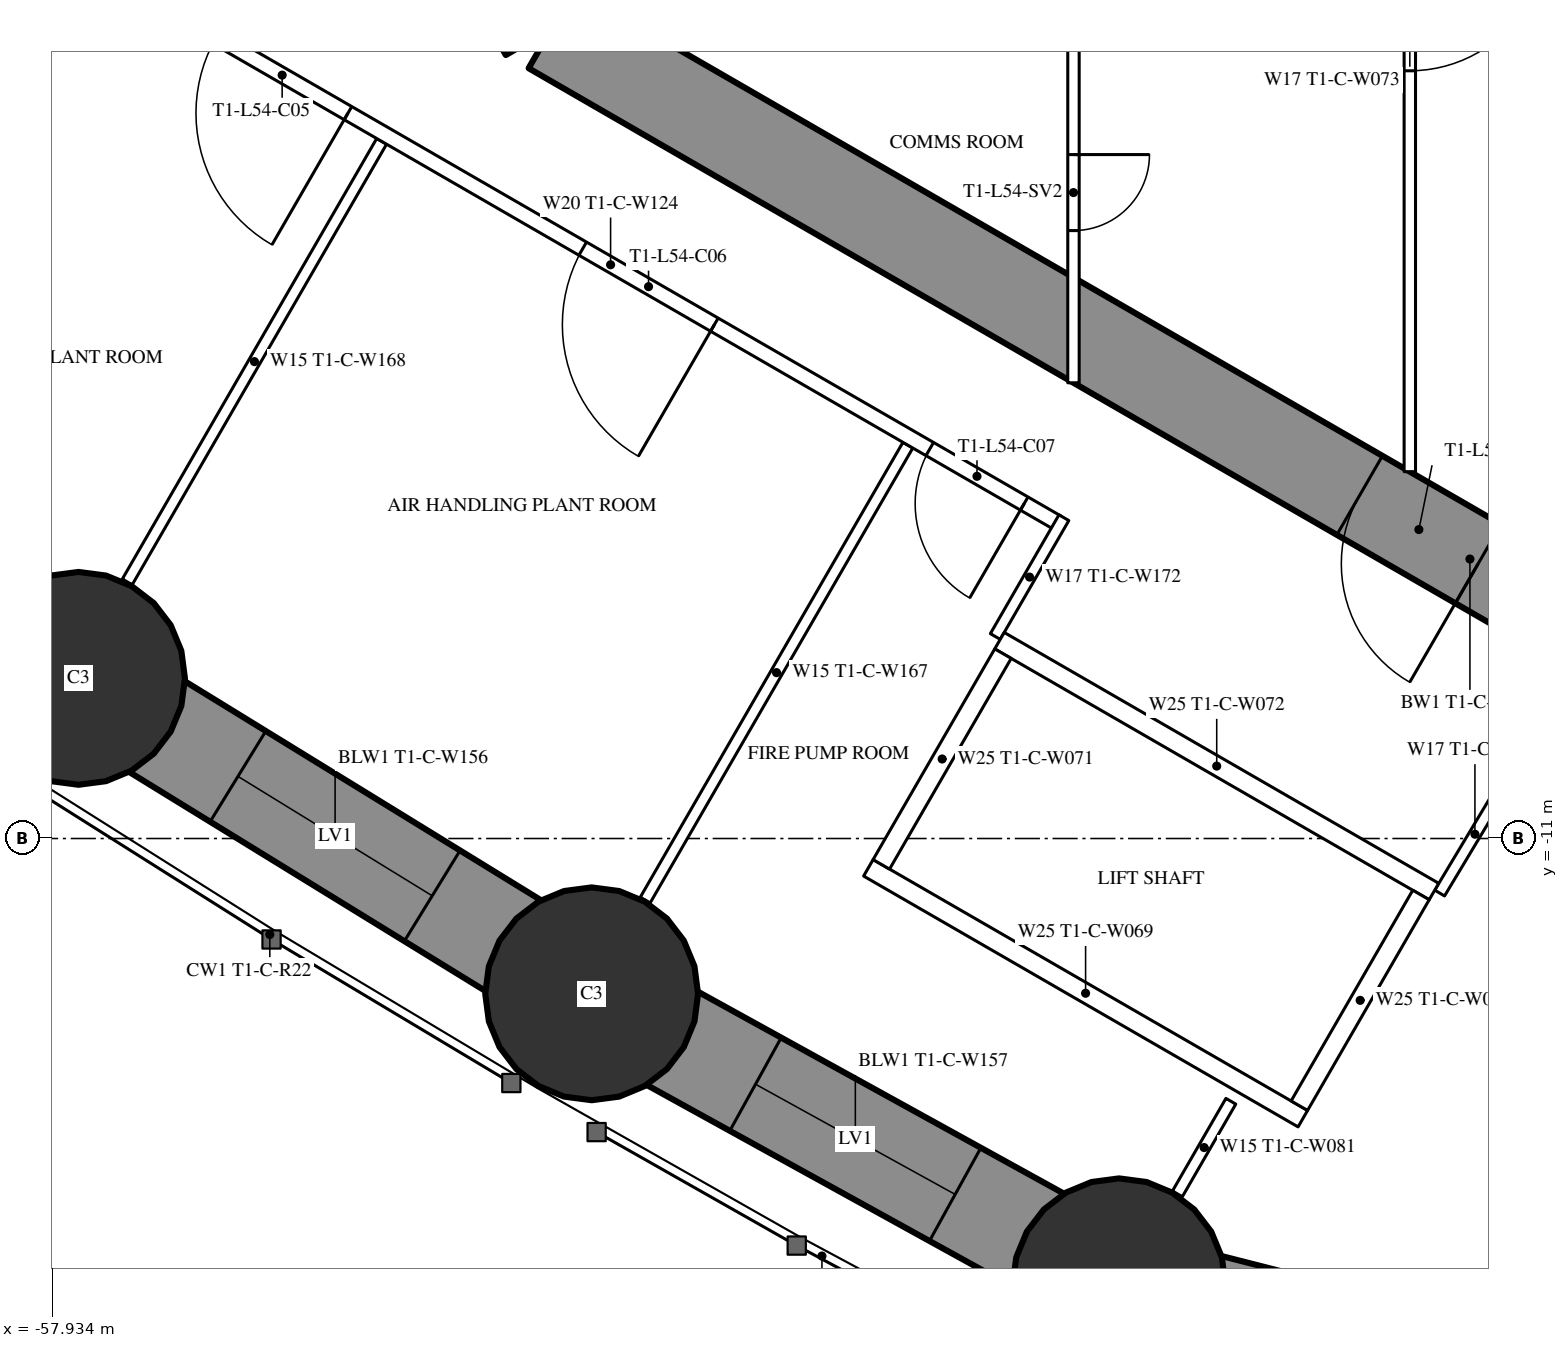
"""IFC4 building model, lengths in metres.
Left out: names, types, materials, properties, quantities, classifications, styles, units other than length and angle.
Written with IfcOpenShell. Run it as: python <this file> out.ifc"""

import sys

from ifc_helpers import new_model, si_unit, direction, frame, frame_2d, origin, origin_2d, place, context, subcontext, project, spatial, rectangle, circle, extrude, element, fill, save


model = new_model("IFC4")
c1 = context("Model", 3, precision=1e-05, world=origin(), true_north=direction((0.0, 1.0)))
c2 = subcontext(c1, "Body", "Model", "MODEL_VIEW")
j1 = project(units=[si_unit("LENGTHUNIT", "METRE"), si_unit("PLANEANGLEUNIT", "RADIAN")], contexts=[c1])
p1 = place(None, origin())
s1 = spatial("IfcSite", under=j1, at=p1, CompositionType="ELEMENT")
p2 = place(p1, origin())
s2 = spatial("IfcBuilding", under=s1, at=p2, CompositionType="ELEMENT")
p3 = place(p2, frame((0.0, 0.0, 201.8)))
s3 = spatial("IfcBuildingStorey", under=s2, at=p3, CompositionType="ELEMENT", Elevation=201.8)
for number, where, z_axis, x_axis in (
    (1, (-57.59, -8.893, 0.0), (0.0, 0.0, 1.0), (1.0, 0.0, 0.0)),
    (2, (-50.839, -13.043, 0.0), (0.0, 0.0, 1.0), (1.0, 0.0, 0.0)),
    (3, (-43.9, -16.871, 0.0), (0.0, 0.0, 1.0), (1.0, 0.0, 0.0)),
):
    element("IfcColumn", number, at=place(p3, frame(where, z_axis=z_axis, x_axis=x_axis)), inside=s3, PredefinedType="COLUMN", context=c2, shape_type="SweptSolid", body=[
        extrude(circle(Radius=1.4, at=origin_2d()), origin(), (0.0, 0.0, 1.0), 3.5),
    ])
p4 = place(p3, frame((-27.2, 14.3, 0.0), z_axis=(0.0, 0.0, 1.0), x_axis=(-0.866026593062, -0.499997940104, 0.0)))
e4 = element("IfcWall", 4, at=p4, inside=s3, PredefinedType="SHEAR", context=c2, shape_type="SweptSolid", body=[
    extrude(rectangle(XDim=28.946, YDim=1.2, at=frame_2d((14.473, 0.0))), origin(), (0.0, 0.0, 1.0), 3.5),
])
p5 = place(p4, frame((6.5, 0.0, 0.0)))
e5 = element("IfcOpeningElement", 5, at=p5, cuts=e4, PredefinedType="OPENING", context=c2, shape_type="SweptSolid", body=[
    extrude(rectangle(XDim=1.0, YDim=2.2, at=frame_2d((0.5, 1.1))), frame((0.0, 0.61, 0.0), z_axis=(0.0, -1.0, 0.0), x_axis=(1.0, 0.0, 0.0)), (0.0, 0.0, 1.0), 1.22),
])
p6 = place(p4, frame((13.395, 0.0, 0.0)))
e6 = element("IfcOpeningElement", 6, at=p6, cuts=e4, PredefinedType="OPENING", context=c2, shape_type="SweptSolid", body=[
    extrude(rectangle(XDim=1.8, YDim=2.03, at=frame_2d((0.9, 1.015))), frame((0.0, 0.61, 0.0), z_axis=(0.0, -1.0, 0.0), x_axis=(1.0, 0.0, 0.0)), (0.0, 0.0, 1.0), 1.22),
])
p7 = place(p3, frame((-27.2, -14.3, 0.0), z_axis=(0.0, 0.0, 1.0), x_axis=(-0.866024021859, 0.500002393557, 0.0)))
e7 = element("IfcWall", 7, at=p7, inside=s3, PredefinedType="SHEAR", context=c2, shape_type="SweptSolid", body=[
    extrude(rectangle(XDim=27.907, YDim=1.2, at=frame_2d((13.954, 0.0))), origin(), (0.0, 0.0, 1.0), 3.5),
])
p8 = place(p7, frame((6.5, 0.0, 0.0)))
e8 = element("IfcOpeningElement", 8, at=p8, cuts=e7, PredefinedType="OPENING", context=c2, shape_type="SweptSolid", body=[
    extrude(rectangle(XDim=1.0, YDim=2.2, at=frame_2d((0.5, 1.1))), frame((0.0, 0.61, 0.0), z_axis=(0.0, -1.0, 0.0), x_axis=(1.0, 0.0, 0.0)), (0.0, 0.0, 1.0), 1.22),
])
p9 = place(p7, frame((13.829, 0.0, 0.0)))
e9 = element("IfcOpeningElement", 9, at=p9, cuts=e7, PredefinedType="OPENING", context=c2, shape_type="SweptSolid", body=[
    extrude(rectangle(XDim=1.8, YDim=2.2, at=frame_2d((0.9, 1.1))), frame((0.0, 0.61, 0.0), z_axis=(0.0, -1.0, 0.0), x_axis=(1.0, 0.0, 0.0)), (0.0, 0.0, 1.0), 1.22),
])
p10 = place(p3, frame((-57.59, 8.893, 0.0), z_axis=(0.0, 0.0, 1.0), x_axis=(-0.628373846765, -0.777911504416, 0.0)))
e10 = element("IfcWall", 10, at=p10, inside=s3, PredefinedType="SHEAR", context=c2, shape_type="SweptSolid", body=[
    extrude(rectangle(XDim=13.611, YDim=1.4, at=frame_2d((6.806, 0.0))), origin(), (0.0, 0.0, 1.0), 3.5),
])
p11 = place(p10, frame((5.306, 0.0, 0.6)))
e11 = element("IfcOpeningElement", 11, at=p11, cuts=e10, PredefinedType="OPENING", context=c2, shape_type="SweptSolid", body=[
    extrude(rectangle(XDim=3.0, YDim=1.2, at=frame_2d((1.5, 0.6))), frame((0.0, 0.71, 0.0), z_axis=(0.0, -1.0, 0.0), x_axis=(1.0, 0.0, 0.0)), (0.0, 0.0, 1.0), 1.42),
])
p12 = place(p3, frame((-66.143, -1.695, 0.0), z_axis=(0.0, 0.0, 1.0), x_axis=(0.765120708367, -0.64388687021, 0.0)))
e12 = element("IfcWall", 12, at=p12, inside=s3, PredefinedType="SHEAR", context=c2, shape_type="SweptSolid", body=[
    extrude(rectangle(XDim=11.179, YDim=1.4, at=frame_2d((5.589, 0.0))), origin(), (0.0, 0.0, 1.0), 3.5),
])
p13 = place(p12, frame((4.089, 0.0, 0.6)))
e13 = element("IfcOpeningElement", 13, at=p13, cuts=e12, PredefinedType="OPENING", context=c2, shape_type="SweptSolid", body=[
    extrude(rectangle(XDim=3.0, YDim=1.2, at=frame_2d((1.5, 0.6))), frame((0.0, 0.71, 0.0), z_axis=(0.0, -1.0, 0.0), x_axis=(1.0, 0.0, 0.0)), (0.0, 0.0, 1.0), 1.42),
])
p14 = place(p3, frame((-57.59, -8.893, 0.0), z_axis=(0.0, 0.0, 1.0), x_axis=(0.851892008043, -0.523717487423, 0.0)))
e14 = element("IfcWall", 14, at=p14, inside=s3, PredefinedType="SHEAR", context=c2, shape_type="SweptSolid", body=[
    extrude(rectangle(XDim=7.924, YDim=1.4, at=frame_2d((3.962, 0.0))), origin(), (0.0, 0.0, 1.0), 3.5),
])
p15 = place(p14, frame((2.462, 0.0, 0.6)))
e15 = element("IfcOpeningElement", 15, at=p15, cuts=e14, PredefinedType="OPENING", context=c2, shape_type="SweptSolid", body=[
    extrude(rectangle(XDim=3.0, YDim=1.2, at=frame_2d((1.5, 0.6))), frame((0.0, 0.71, 0.0), z_axis=(0.0, -1.0, 0.0), x_axis=(1.0, 0.0, 0.0)), (0.0, 0.0, 1.0), 1.42),
])
p16 = place(p3, frame((-50.839, -13.043, 0.0), z_axis=(0.0, 0.0, 1.0), x_axis=(0.875577684027, -0.483077342911, 0.0)))
e16 = element("IfcWall", 16, at=p16, inside=s3, PredefinedType="SHEAR", context=c2, shape_type="SweptSolid", body=[
    extrude(rectangle(XDim=7.925, YDim=1.4, at=frame_2d((3.962, 0.0))), origin(), (0.0, 0.0, 1.0), 3.5),
])
p17 = place(p16, frame((2.462, 0.0, 0.6)))
e17 = element("IfcOpeningElement", 17, at=p17, cuts=e16, PredefinedType="OPENING", context=c2, shape_type="SweptSolid", body=[
    extrude(rectangle(XDim=3.0, YDim=1.2, at=frame_2d((1.5, 0.6))), frame((0.0, 0.71, 0.0), z_axis=(0.0, -1.0, 0.0), x_axis=(1.0, 0.0, 0.0)), (0.0, 0.0, 1.0), 1.42),
])
p18 = place(p3, frame((-43.9, -16.871, 0.0), z_axis=(0.0, 0.0, 1.0), x_axis=(0.969008414312, -0.247027717052, 0.0)))
e18 = element("IfcWall", 18, at=p18, inside=s3, PredefinedType="SHEAR", context=c2, shape_type="SweptSolid", body=[
    extrude(rectangle(XDim=12.729, YDim=1.4, at=frame_2d((6.365, 0.0))), origin(), (0.0, 0.0, 1.0), 3.5),
])
p19 = place(p18, frame((4.865, 0.0, 0.6)))
e19 = element("IfcOpeningElement", 19, at=p19, cuts=e18, PredefinedType="OPENING", context=c2, shape_type="SweptSolid", body=[
    extrude(rectangle(XDim=3.0, YDim=1.2, at=frame_2d((1.5, 0.6))), frame((0.0, 0.71, 0.0), z_axis=(0.0, -1.0, 0.0), x_axis=(1.0, 0.0, 0.0)), (0.0, 0.0, 1.0), 1.42),
])
p20 = place(p3, frame((-46.679, -5.825, 0.0), z_axis=(0.0, 0.0, 1.0), x_axis=(-0.500006839597, -0.866021454905, 0.0)))
e20 = element("IfcWall", 20, at=p20, inside=s3, PredefinedType="PARTITIONING", context=c2, shape_type="SweptSolid", body=[
    extrude(rectangle(XDim=6.911, YDim=0.15, at=frame_2d((3.456, 0.0))), origin(), (0.0, 0.0, 1.0), 2.05),
])
p21 = place(p3, frame((-53.602, -1.828, 0.0), z_axis=(0.0, 0.0, 1.0), x_axis=(-0.49999191814, -0.866030069798, 0.0)))
e21 = element("IfcWall", 21, at=p21, inside=s3, PredefinedType="PARTITIONING", context=c2, shape_type="SweptSolid", body=[
    extrude(rectangle(XDim=6.692, YDim=0.15, at=frame_2d((3.346, 0.0))), origin(), (0.0, 0.0, 1.0), 2.05),
])
p22 = place(p3, frame((-42.429, -14.457, 0.0), z_axis=(0.0, 0.0, 1.0), x_axis=(-0.5000578829, -0.865991982497, 0.0)))
e22 = element("IfcWall", 22, at=p22, inside=s3, PredefinedType="PARTITIONING", context=c2, shape_type="SweptSolid", body=[
    extrude(rectangle(XDim=1.407, YDim=0.15, at=frame_2d((0.704, 0.0))), origin(), (0.0, 0.0, 1.0), 3.25),
])
p23 = place(p3, frame((-44.715, -6.844, 0.0), z_axis=(0.0, 0.0, 1.0), x_axis=(-0.866025261224, 0.500000246922, 0.0)))
e23 = element("IfcWall", 23, at=p23, inside=s3, PredefinedType="PARTITIONING", context=c2, shape_type="SweptSolid", body=[
    extrude(rectangle(XDim=13.567, YDim=0.2, at=frame_2d((6.783, 0.0))), origin(), (0.0, 0.0, 1.0), 3.25),
])
p24 = place(p23, frame((10.773, 0.0, 0.0)))
e24 = element("IfcOpeningElement", 24, at=p24, cuts=e23, PredefinedType="OPENING", context=c2, shape_type="SweptSolid", body=[
    extrude(rectangle(XDim=2.0, YDim=2.03, at=frame_2d((1.0, 1.015))), frame((0.0, 0.11, 0.0), z_axis=(0.0, -1.0, 0.0), x_axis=(1.0, 0.0, 0.0)), (0.0, 0.0, 1.0), 0.22),
])
p25 = place(p23, frame((5.207, 0.0, 0.0)))
e25 = element("IfcOpeningElement", 25, at=p25, cuts=e23, PredefinedType="OPENING", context=c2, shape_type="SweptSolid", body=[
    extrude(rectangle(XDim=2.0, YDim=2.4, at=frame_2d((1.0, 1.2))), frame((0.0, 0.11, 0.0), z_axis=(0.0, -1.0, 0.0), x_axis=(1.0, 0.0, 0.0)), (0.0, 0.0, 1.0), 0.22),
])
p26 = place(p23, frame((0.5, 0.0, 0.0)))
e26 = element("IfcOpeningElement", 26, at=p26, cuts=e23, PredefinedType="OPENING", context=c2, shape_type="SweptSolid", body=[
    extrude(rectangle(XDim=1.435, YDim=2.03, at=frame_2d((0.718, 1.015))), frame((0.0, 0.11, 0.0), z_axis=(0.0, -1.0, 0.0), x_axis=(1.0, 0.0, 0.0)), (0.0, 0.0, 1.0), 0.22),
])
for number, where, z_axis, x_axis in (
    (27, (-44.626, -6.779, 0.0), (0.0, 0.0, 1.0), (-0.5, -0.866, 0.0)),
    (28, (-39.683, -11.718, 0.0), (0.0, 0.0, 1.0), (0.514, 0.858, 0.0)),
):
    element("IfcWall", number, at=place(p3, frame(where, z_axis=z_axis, x_axis=x_axis)), inside=s3, PredefinedType="PARTITIONING", context=c2, shape_type="SweptSolid", body=[
        extrude(rectangle(XDim=1.805, YDim=0.15, at=frame_2d((0.903, 0.0))), origin(), (0.0, 0.0, 1.0), 3.25),
    ])
p27 = place(p3, frame((-40.075, 6.174, 0.0), z_axis=(0.0, 0.0, 1.0), x_axis=(0.0, -1.0, 0.0)))
e29 = element("IfcWall", 29, at=p27, inside=s3, PredefinedType="PARTITIONING", context=c2, shape_type="SweptSolid", body=[
    extrude(rectangle(XDim=12.348, YDim=0.15, at=frame_2d((6.174, 0.0))), origin(), (0.0, 0.0, 1.0), 3.25),
])
p28 = place(p27, frame((5.274, 0.0, 0.0)))
e30 = element("IfcOpeningElement", 30, at=p28, cuts=e29, PredefinedType="OPENING", context=c2, shape_type="SweptSolid", body=[
    extrude(rectangle(XDim=1.8, YDim=2.2, at=frame_2d((0.9, 1.1))), frame((0.0, 0.085, 0.0), z_axis=(0.0, -1.0, 0.0), x_axis=(1.0, 0.0, 0.0)), (0.0, 0.0, 1.0), 0.17),
])
p29 = place(p3, frame((-44.5, 5.005, 0.0), z_axis=(0.0, 0.0, 1.0), x_axis=(0.0, -1.0, 0.0)))
e31 = element("IfcWall", 31, at=p29, inside=s3, PredefinedType="PARTITIONING", context=c2, shape_type="SweptSolid", body=[
    extrude(rectangle(XDim=10.009, YDim=0.15, at=frame_2d((5.005, 0.0))), origin(), (0.0, 0.0, 1.0), 3.25),
])
p30 = place(p29, frame((2.002, 0.0, 0.0)))
e32 = element("IfcOpeningElement", 32, at=p30, cuts=e31, PredefinedType="OPENING", context=c2, shape_type="SweptSolid", body=[
    extrude(rectangle(XDim=1.0, YDim=2.2, at=frame_2d((0.5, 1.1))), frame((0.0, 0.085, 0.0), z_axis=(0.0, -1.0, 0.0), x_axis=(1.0, 0.0, 0.0)), (0.0, 0.0, 1.0), 0.17),
])
p31 = place(p29, frame((7.007, 0.0, 0.0)))
e33 = element("IfcOpeningElement", 33, at=p31, cuts=e31, PredefinedType="OPENING", context=c2, shape_type="SweptSolid", body=[
    extrude(rectangle(XDim=1.0, YDim=2.2, at=frame_2d((0.5, 1.1))), frame((0.0, 0.085, 0.0), z_axis=(0.0, -1.0, 0.0), x_axis=(1.0, 0.0, 0.0)), (0.0, 0.0, 1.0), 0.17),
])
p32 = place(p3, frame((-39.758, -11.697, 0.0), z_axis=(0.0, 0.0, 1.0), x_axis=(-0.866024194504, 0.500002094529, 0.0)))
e34 = element("IfcWall", 34, at=p32, inside=s3, PredefinedType="PARTITIONING", context=c2, shape_type="SweptSolid", body=[
    extrude(rectangle(XDim=6.6, YDim=0.25, at=frame_2d((3.3, 0.0))), origin(), (0.0, 0.0, 1.0), 3.25),
])
p33 = place(p3, frame((-41.482, -14.686, 0.0), z_axis=(0.0, 0.0, 1.0), x_axis=(-0.86603344179, 0.499986077507, 0.0)))
e35 = element("IfcWall", 35, at=p33, inside=s3, PredefinedType="PARTITIONING", context=c2, shape_type="SweptSolid", body=[
    extrude(rectangle(XDim=6.6, YDim=0.25, at=frame_2d((3.3, 0.0))), origin(), (0.0, 0.0, 1.0), 3.25),
])
for number, where, z_axis, x_axis in (
    (36, (-39.928, -11.743, 0.0), (0.0, 0.0, 1.0), (-0.5, -0.866, 0.0)),
    (37, (-45.428, -8.568, 0.0), (0.0, 0.0, 1.0), (-0.5, -0.866, 0.0)),
):
    element("IfcWall", number, at=place(p3, frame(where, z_axis=z_axis, x_axis=x_axis)), inside=s3, PredefinedType="PARTITIONING", context=c2, shape_type="SweptSolid", body=[
        extrude(rectangle(XDim=3.201, YDim=0.25, at=frame_2d((1.6, 0.0))), origin(), (0.0, 0.0, 1.0), 3.25),
    ])
p34 = place(p15, origin())
e38 = element("IfcWindow", 38, at=p34, inside=s3, PartitioningType="SINGLE_PANEL", PredefinedType="WINDOW", context=c2, shape_type="SweptSolid", body=[
    extrude(rectangle(XDim=3.0, YDim=1.2, at=frame_2d((1.5, 0.6))), frame((0.0, 0.03, 0.0), z_axis=(0.0, -1.0, 0.0), x_axis=(1.0, 0.0, 0.0)), (0.0, 0.0, 1.0), 0.06),
])
fill(e15, e38)
p35 = place(p17, origin())
e39 = element("IfcWindow", 39, at=p35, inside=s3, PartitioningType="SINGLE_PANEL", PredefinedType="WINDOW", context=c2, shape_type="SweptSolid", body=[
    extrude(rectangle(XDim=3.0, YDim=1.2, at=frame_2d((1.5, 0.6))), frame((0.0, 0.03, 0.0), z_axis=(0.0, -1.0, 0.0), x_axis=(1.0, 0.0, 0.0)), (0.0, 0.0, 1.0), 0.06),
])
fill(e17, e39)
p36 = place(p24, origin())
e40 = element("IfcDoor", 40, at=p36, inside=s3, OperationType="DOUBLE_DOOR_SINGLE_SWING", PredefinedType="DOOR", context=c2, shape_type="SweptSolid", body=[
    extrude(rectangle(XDim=2.0, YDim=2.03, at=frame_2d((1.0, 1.015))), frame((0.0, 0.025, 0.0), z_axis=(0.0, -1.0, 0.0), x_axis=(1.0, 0.0, 0.0)), (0.0, 0.0, 1.0), 0.05),
])
fill(e24, e40)
p37 = place(p25, origin())
e41 = element("IfcDoor", 41, at=p37, inside=s3, OperationType="DOUBLE_DOOR_SINGLE_SWING", PredefinedType="DOOR", context=c2, shape_type="SweptSolid", body=[
    extrude(rectangle(XDim=2.0, YDim=2.4, at=frame_2d((1.0, 1.2))), frame((0.0, 0.025, 0.0), z_axis=(0.0, -1.0, 0.0), x_axis=(1.0, 0.0, 0.0)), (0.0, 0.0, 1.0), 0.05),
])
fill(e25, e41)
p38 = place(p26, origin())
e42 = element("IfcDoor", 42, at=p38, inside=s3, OperationType="SINGLE_SWING_LEFT", PredefinedType="DOOR", context=c2, shape_type="SweptSolid", body=[
    extrude(rectangle(XDim=1.435, YDim=2.03, at=frame_2d((0.718, 1.015))), frame((0.0, 0.025, 0.0), z_axis=(0.0, -1.0, 0.0), x_axis=(1.0, 0.0, 0.0)), (0.0, 0.0, 1.0), 0.05),
])
fill(e26, e42)
p39 = place(p28, origin())
e43 = element("IfcDoor", 43, at=p39, inside=s3, OperationType="DOUBLE_DOOR_SINGLE_SWING", PredefinedType="DOOR", context=c2, shape_type="SweptSolid", body=[
    extrude(rectangle(XDim=1.8, YDim=2.2, at=frame_2d((0.9, 1.1))), frame((0.0, 0.025, 0.0), z_axis=(0.0, -1.0, 0.0), x_axis=(1.0, 0.0, 0.0)), (0.0, 0.0, 1.0), 0.05),
])
fill(e30, e43)
p40 = place(p31, origin())
e44 = element("IfcDoor", 44, at=p40, inside=s3, OperationType="SINGLE_SWING_LEFT", PredefinedType="DOOR", context=c2, shape_type="SweptSolid", body=[
    extrude(rectangle(XDim=1.0, YDim=2.2, at=frame_2d((0.5, 1.1))), frame((0.0, 0.025, 0.0), z_axis=(0.0, -1.0, 0.0), x_axis=(1.0, 0.0, 0.0)), (0.0, 0.0, 1.0), 0.05),
])
fill(e33, e44)
p41 = place(p9, origin())
e45 = element("IfcDoor", 45, at=p41, inside=s3, OperationType="DOUBLE_DOOR_SINGLE_SWING", PredefinedType="DOOR", context=c2, shape_type="SweptSolid", body=[
    extrude(rectangle(XDim=1.8, YDim=2.2, at=frame_2d((0.9, 1.1))), frame((0.0, 0.025, 0.0), z_axis=(0.0, -1.0, 0.0), x_axis=(1.0, 0.0, 0.0)), (0.0, 0.0, 1.0), 0.05),
])
fill(e9, e45)
save(model, sys.argv[1])
